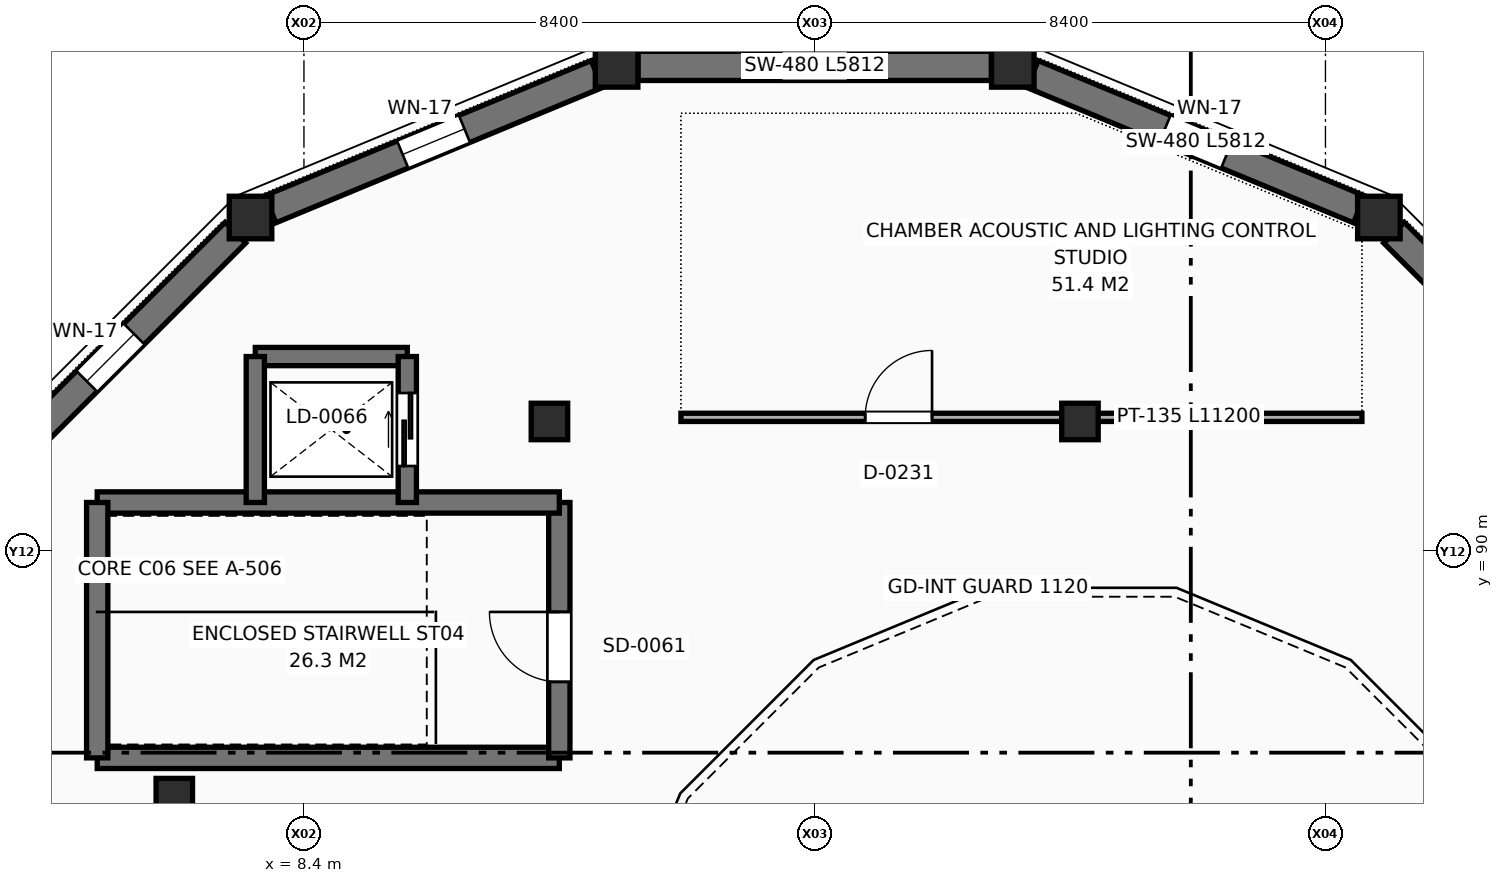
"""IFC4 building model, lengths in metres.
Left out: names, types, materials, properties, quantities, classifications, styles, units other than length and angle.
Written with IfcOpenShell. Run it as: python <this file> out.ifc"""

import sys

from ifc_helpers import new_model, si_unit, direction, frame, frame_2d, origin, origin_2d, place, context, subcontext, project, spatial, rectangle, circle, extrude, element, fill, save


model = new_model("IFC4")
c1 = context("Model", 3, precision=1e-05, world=origin(), true_north=direction((0.0, 1.0)))
c2 = subcontext(c1, "Body", "Model", "MODEL_VIEW")
j1 = project(units=[si_unit("LENGTHUNIT", "METRE"), si_unit("PLANEANGLEUNIT", "RADIAN")], contexts=[c1])
p1 = place(None, origin())
s1 = spatial("IfcSite", under=j1, at=p1, CompositionType="ELEMENT")
p2 = place(p1, origin())
s2 = spatial("IfcBuilding", under=s1, at=p2, CompositionType="ELEMENT")
p3 = place(p2, frame((0.0, 0.0, 13.8)))
s3 = spatial("IfcBuildingStorey", under=s2, at=p3, CompositionType="ELEMENT", Elevation=13.8)
for number, where, z_axis, x_axis in (
    (1, (26.079, 95.486, 0.0), (0.0, 0.0, 1.0), (1.0, 0.0, 0.0)),
    (2, (20.058, 97.98, 0.0), (0.0, 0.0, 1.0), (1.0, 0.0, 0.0)),
    (3, (13.542, 97.98, 0.0), (0.0, 0.0, 1.0), (1.0, 0.0, 0.0)),
    (4, (7.521, 95.486, 0.0), (0.0, 0.0, 1.0), (1.0, 0.0, 0.0)),
):
    element("IfcColumn", number, at=place(p3, frame(where, z_axis=z_axis, x_axis=x_axis)), inside=s3, PredefinedType="COLUMN", context=c2, shape_type="SweptSolid", body=[
        extrude(circle(Radius=0.35, at=origin_2d()), origin(), (0.0, 0.0, 1.0), 4.2),
    ])
for number, where, z_axis, x_axis in (
    (5, (21.163, 92.132, 0.0), (0.0, 0.0, 1.0), (1.0, 0.0, 0.0)),
    (6, (12.438, 92.132, 0.0), (0.0, 0.0, 1.0), (1.0, 0.0, 0.0)),
    (7, (6.268, 85.963, 0.0), (0.0, 0.0, 1.0), (1.0, 0.0, 0.0)),
):
    element("IfcColumn", number, at=place(p3, frame(where, z_axis=z_axis, x_axis=x_axis)), inside=s3, PredefinedType="COLUMN", context=c2, shape_type="SweptSolid", body=[
        extrude(circle(Radius=0.3, at=origin_2d()), origin(), (0.0, 0.0, 1.0), 4.2),
    ])
p4 = place(p3, frame((30.438, 91.127, 0.0), z_axis=(0.0, 0.0, 1.0), x_axis=(-0.707127782591, 0.707085779159, 0.0)))
e8 = element("IfcWall", 8, at=p4, inside=s3, PredefinedType="SHEAR", context=c2, shape_type="SweptSolid", body=[
    extrude(rectangle(XDim=5.812, YDim=0.48, at=frame_2d((2.906, 0.0))), origin(), (0.0, 0.0, 1.0), 3.1),
])
p5 = place(p4, frame((2.356, 0.0, 0.9)))
e9 = element("IfcOpeningElement", 9, at=p5, cuts=e8, PredefinedType="OPENING", context=c2, shape_type="SweptSolid", body=[
    extrude(rectangle(XDim=1.1, YDim=1.8, at=frame_2d((0.55, 0.9))), frame((0.0, 0.25, 0.0), z_axis=(0.0, -1.0, 0.0), x_axis=(1.0, 0.0, 0.0)), (0.0, 0.0, 1.0), 0.5),
])
p6 = place(p3, frame((25.753, 95.621, 0.0), z_axis=(0.0, 0.0, 1.0), x_axis=(-0.923894998564, 0.382646091877, 0.0)))
e10 = element("IfcWall", 10, at=p6, inside=s3, PredefinedType="SHEAR", context=c2, shape_type="SweptSolid", body=[
    extrude(rectangle(XDim=5.812, YDim=0.48, at=frame_2d((2.906, 0.0))), origin(), (0.0, 0.0, 1.0), 3.1),
])
p7 = place(p6, frame((2.356, 0.0, 0.9)))
e11 = element("IfcOpeningElement", 11, at=p7, cuts=e10, PredefinedType="OPENING", context=c2, shape_type="SweptSolid", body=[
    extrude(rectangle(XDim=1.1, YDim=1.8, at=frame_2d((0.55, 0.9))), frame((0.0, 0.25, 0.0), z_axis=(0.0, -1.0, 0.0), x_axis=(1.0, 0.0, 0.0)), (0.0, 0.0, 1.0), 0.5),
])
p8 = place(p3, frame((19.706, 97.98, 0.0), z_axis=(0.0, 0.0, 1.0), x_axis=(-1.0, 0.0, 0.0)))
e12 = element("IfcWall", 12, at=p8, inside=s3, PredefinedType="SHEAR", context=c2, shape_type="SweptSolid", body=[
    extrude(rectangle(XDim=5.812, YDim=0.48, at=frame_2d((2.906, 0.0))), origin(), (0.0, 0.0, 1.0), 3.1),
])
p9 = place(p8, frame((2.356, 0.0, 0.9)))
e13 = element("IfcOpeningElement", 13, at=p9, cuts=e12, PredefinedType="OPENING", context=c2, shape_type="SweptSolid", body=[
    extrude(rectangle(XDim=1.1, YDim=1.8, at=frame_2d((0.55, 0.9))), frame((0.0, 0.25, 0.0), z_axis=(0.0, -1.0, 0.0), x_axis=(1.0, 0.0, 0.0)), (0.0, 0.0, 1.0), 0.5),
])
p10 = place(p3, frame((13.217, 97.845, 0.0), z_axis=(0.0, 0.0, 1.0), x_axis=(-0.923888848229, -0.382660941458, 0.0)))
e14 = element("IfcWall", 14, at=p10, inside=s3, PredefinedType="SHEAR", context=c2, shape_type="SweptSolid", body=[
    extrude(rectangle(XDim=5.812, YDim=0.48, at=frame_2d((2.906, 0.0))), origin(), (0.0, 0.0, 1.0), 3.1),
])
p11 = place(p10, frame((2.356, 0.0, 0.9)))
e15 = element("IfcOpeningElement", 15, at=p11, cuts=e14, PredefinedType="OPENING", context=c2, shape_type="SweptSolid", body=[
    extrude(rectangle(XDim=1.1, YDim=1.8, at=frame_2d((0.55, 0.9))), frame((0.0, 0.25, 0.0), z_axis=(0.0, -1.0, 0.0), x_axis=(1.0, 0.0, 0.0)), (0.0, 0.0, 1.0), 0.5),
])
p12 = place(p3, frame((7.273, 95.237, 0.0), z_axis=(0.0, 0.0, 1.0), x_axis=(-0.707127782591, -0.707085779159, 0.0)))
e16 = element("IfcWall", 16, at=p12, inside=s3, PredefinedType="SHEAR", context=c2, shape_type="SweptSolid", body=[
    extrude(rectangle(XDim=5.812, YDim=0.48, at=frame_2d((2.906, 0.0))), origin(), (0.0, 0.0, 1.0), 3.1),
])
p13 = place(p12, frame((2.356, 0.0, 0.9)))
e17 = element("IfcOpeningElement", 17, at=p13, cuts=e16, PredefinedType="OPENING", context=c2, shape_type="SweptSolid", body=[
    extrude(rectangle(XDim=1.1, YDim=1.8, at=frame_2d((0.55, 0.9))), frame((0.0, 0.25, 0.0), z_axis=(0.0, -1.0, 0.0), x_axis=(1.0, 0.0, 0.0)), (0.0, 0.0, 1.0), 0.5),
])
p14 = place(p3, frame((5.0, 86.6, 0.0), z_axis=(0.0, 0.0, 1.0), x_axis=(1.0, 0.0, 0.0)))
e18 = element("IfcWall", 18, at=p14, inside=s3, PredefinedType="SHEAR", context=c2, shape_type="SweptSolid", body=[
    extrude(rectangle(XDim=7.6, YDim=0.35, at=frame_2d((3.8, 0.0))), origin(), (0.0, 0.0, 1.0), 3.92),
])
p15 = place(p3, frame((12.6, 86.6, 0.0), z_axis=(0.0, 0.0, 1.0), x_axis=(0.0, 1.0, 0.0)))
e19 = element("IfcWall", 19, at=p15, inside=s3, PredefinedType="SHEAR", context=c2, shape_type="SweptSolid", body=[
    extrude(rectangle(XDim=4.2, YDim=0.35, at=frame_2d((2.1, 0.0))), origin(), (0.0, 0.0, 1.0), 3.92),
])
p16 = place(p15, frame((1.25, 0.0, 0.0)))
e20 = element("IfcOpeningElement", 20, at=p16, cuts=e19, PredefinedType="OPENING", context=c2, shape_type="SweptSolid", body=[
    extrude(rectangle(XDim=1.15, YDim=2.2, at=frame_2d((0.575, 1.1))), frame((0.0, 0.185, 0.0), z_axis=(0.0, -1.0, 0.0), x_axis=(1.0, 0.0, 0.0)), (0.0, 0.0, 1.0), 0.37),
])
p17 = place(p3, frame((12.6, 90.8, 0.0), z_axis=(0.0, 0.0, 1.0), x_axis=(-1.0, 0.0, 0.0)))
e21 = element("IfcWall", 21, at=p17, inside=s3, PredefinedType="SHEAR", context=c2, shape_type="SweptSolid", body=[
    extrude(rectangle(XDim=7.6, YDim=0.35, at=frame_2d((3.8, 0.0))), origin(), (0.0, 0.0, 1.0), 3.92),
])
p18 = place(p3, frame((5.0, 90.8, 0.0), z_axis=(0.0, 0.0, 1.0), x_axis=(0.0, -1.0, 0.0)))
e22 = element("IfcWall", 22, at=p18, inside=s3, PredefinedType="SHEAR", context=c2, shape_type="SweptSolid", body=[
    extrude(rectangle(XDim=4.2, YDim=0.35, at=frame_2d((2.1, 0.0))), origin(), (0.0, 0.0, 1.0), 3.92),
])
p19 = place(p3, frame((10.1, 93.2, 0.0), z_axis=(0.0, 0.0, 1.0), x_axis=(-1.0, 0.0, 0.0)))
e23 = element("IfcWall", 23, at=p19, inside=s3, PredefinedType="SHEAR", context=c2, shape_type="SweptSolid", body=[
    extrude(rectangle(XDim=2.5, YDim=0.3, at=frame_2d((1.25, 0.0))), origin(), (0.0, 0.0, 1.0), 3.92),
])
p20 = place(p3, frame((7.6, 93.2, 0.0), z_axis=(0.0, 0.0, 1.0), x_axis=(0.0, -1.0, 0.0)))
e24 = element("IfcWall", 24, at=p20, inside=s3, PredefinedType="SHEAR", context=c2, shape_type="SweptSolid", body=[
    extrude(rectangle(XDim=2.4, YDim=0.3, at=frame_2d((1.2, 0.0))), origin(), (0.0, 0.0, 1.0), 3.92),
])
p21 = place(p3, frame((10.1, 90.8, 0.0), z_axis=(0.0, 0.0, 1.0), x_axis=(0.0, 1.0, 0.0)))
e25 = element("IfcWall", 25, at=p21, inside=s3, PredefinedType="SHEAR", context=c2, shape_type="SweptSolid", body=[
    extrude(rectangle(XDim=2.4, YDim=0.3, at=frame_2d((1.2, 0.0))), origin(), (0.0, 0.0, 1.0), 3.92),
])
p22 = place(p21, frame((0.6, 0.0, 0.0)))
e26 = element("IfcOpeningElement", 26, at=p22, cuts=e25, PredefinedType="OPENING", context=c2, shape_type="SweptSolid", body=[
    extrude(rectangle(XDim=1.2, YDim=2.25, at=frame_2d((0.6, 1.125))), frame((0.0, 0.16, 0.0), z_axis=(0.0, -1.0, 0.0), x_axis=(1.0, 0.0, 0.0)), (0.0, 0.0, 1.0), 0.32),
])
p23 = place(p3, frame((14.6, 92.2, 0.0), z_axis=(0.0, 0.0, 1.0), x_axis=(1.0, 0.0, 0.0)))
e27 = element("IfcWall", 27, at=p23, inside=s3, PredefinedType="PARTITIONING", context=c2, shape_type="SweptSolid", body=[
    extrude(rectangle(XDim=11.2, YDim=0.135, at=frame_2d((5.6, 0.0))), origin(), (0.0, 0.0, 1.0), 3.86),
])
p24 = place(p23, frame((3.03, 0.0, 0.0)))
e28 = element("IfcOpeningElement", 28, at=p24, cuts=e27, PredefinedType="OPENING", context=c2, shape_type="SweptSolid", body=[
    extrude(rectangle(XDim=1.1, YDim=2.15, at=frame_2d((0.55, 1.075))), frame((0.0, 0.077, 0.0), z_axis=(0.0, -1.0, 0.0), x_axis=(1.0, 0.0, 0.0)), (0.0, 0.0, 1.0), 0.155),
])
p25 = place(p7, origin())
e29 = element("IfcWindow", 29, at=p25, inside=s3, PartitioningType="SINGLE_PANEL", PredefinedType="WINDOW", context=c2, shape_type="SweptSolid", body=[
    extrude(rectangle(XDim=1.1, YDim=1.8, at=frame_2d((0.55, 0.9))), frame((0.0, 0.03, 0.0), z_axis=(0.0, -1.0, 0.0), x_axis=(1.0, 0.0, 0.0)), (0.0, 0.0, 1.0), 0.06),
])
fill(e11, e29)
p26 = place(p9, origin())
e30 = element("IfcWindow", 30, at=p26, inside=s3, PartitioningType="SINGLE_PANEL", PredefinedType="WINDOW", context=c2, shape_type="SweptSolid", body=[
    extrude(rectangle(XDim=1.1, YDim=1.8, at=frame_2d((0.55, 0.9))), frame((0.0, 0.03, 0.0), z_axis=(0.0, -1.0, 0.0), x_axis=(1.0, 0.0, 0.0)), (0.0, 0.0, 1.0), 0.06),
])
fill(e13, e30)
p27 = place(p11, origin())
e31 = element("IfcWindow", 31, at=p27, inside=s3, PartitioningType="SINGLE_PANEL", PredefinedType="WINDOW", context=c2, shape_type="SweptSolid", body=[
    extrude(rectangle(XDim=1.1, YDim=1.8, at=frame_2d((0.55, 0.9))), frame((0.0, 0.03, 0.0), z_axis=(0.0, -1.0, 0.0), x_axis=(1.0, 0.0, 0.0)), (0.0, 0.0, 1.0), 0.06),
])
fill(e15, e31)
p28 = place(p13, origin())
e32 = element("IfcWindow", 32, at=p28, inside=s3, PartitioningType="SINGLE_PANEL", PredefinedType="WINDOW", context=c2, shape_type="SweptSolid", body=[
    extrude(rectangle(XDim=1.1, YDim=1.8, at=frame_2d((0.55, 0.9))), frame((0.0, 0.03, 0.0), z_axis=(0.0, -1.0, 0.0), x_axis=(1.0, 0.0, 0.0)), (0.0, 0.0, 1.0), 0.06),
])
fill(e17, e32)
p29 = place(p16, origin())
e33 = element("IfcDoor", 33, at=p29, inside=s3, OperationType="SINGLE_SWING_RIGHT", PredefinedType="DOOR", context=c2, shape_type="SweptSolid", body=[
    extrude(rectangle(XDim=1.15, YDim=2.2, at=frame_2d((0.575, 1.1))), frame((0.0, 0.025, 0.0), z_axis=(0.0, -1.0, 0.0), x_axis=(1.0, 0.0, 0.0)), (0.0, 0.0, 1.0), 0.05),
])
fill(e20, e33)
p30 = place(p22, origin())
e34 = element("IfcDoor", 34, at=p30, inside=s3, OperationType="SLIDING_TO_LEFT", PredefinedType="DOOR", context=c2, shape_type="SweptSolid", body=[
    extrude(rectangle(XDim=1.2, YDim=2.25, at=frame_2d((0.6, 1.125))), frame((0.0, 0.025, 0.0), z_axis=(0.0, -1.0, 0.0), x_axis=(1.0, 0.0, 0.0)), (0.0, 0.0, 1.0), 0.05),
])
fill(e26, e34)
p31 = place(p24, origin())
e35 = element("IfcDoor", 35, at=p31, inside=s3, OperationType="SINGLE_SWING_RIGHT", PredefinedType="DOOR", context=c2, shape_type="SweptSolid", body=[
    extrude(rectangle(XDim=1.1, YDim=2.15, at=frame_2d((0.55, 1.075))), frame((0.0, 0.025, 0.0), z_axis=(0.0, -1.0, 0.0), x_axis=(1.0, 0.0, 0.0)), (0.0, 0.0, 1.0), 0.05),
])
fill(e28, e35)
save(model, sys.argv[1])
